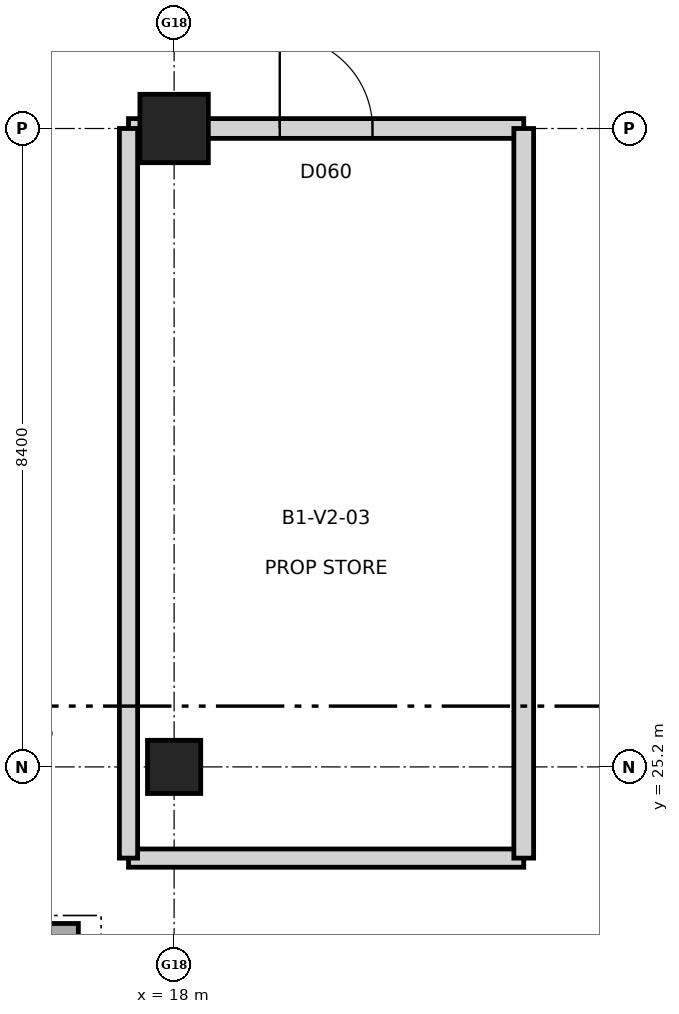
"""IFC4 building model, lengths in metres.
Left out: names, types, materials, properties, quantities, classifications, styles, units other than length and angle.
Written with IfcOpenShell. Run it as: python <this file> out.ifc"""

import sys

from ifc_helpers import new_model, si_unit, direction, frame, frame_2d, origin, origin_2d, place, context, subcontext, project, spatial, rectangle, extrude, element, fill, save


model = new_model("IFC4")
c1 = context("Model", 3, precision=1e-05, world=origin(), true_north=direction((0.0, 1.0)))
c2 = subcontext(c1, "Body", "Model", "MODEL_VIEW")
j1 = project(units=[si_unit("LENGTHUNIT", "METRE"), si_unit("PLANEANGLEUNIT", "RADIAN")], contexts=[c1])
p1 = place(None, origin())
s1 = spatial("IfcSite", under=j1, at=p1, CompositionType="ELEMENT")
p2 = place(p1, origin())
s2 = spatial("IfcBuilding", under=s1, at=p2, CompositionType="ELEMENT")
p3 = place(p2, frame((0.0, 0.0, -5.4)))
s3 = spatial("IfcBuildingStorey", under=s2, at=p3, CompositionType="ELEMENT", Elevation=-5.4)
p4 = place(p3, frame((18.0, 25.2, 0.0), z_axis=(0.0, 0.0, 1.0), x_axis=(1.0, 0.0, 0.0)))
e1 = element("IfcColumn", 1, at=p4, inside=s3, PredefinedType="COLUMN", context=c2, shape_type="SweptSolid", body=[
    extrude(rectangle(XDim=0.7, YDim=0.7, at=origin_2d()), origin(), (0.0, 0.0, 1.0), 5.4),
])
p5 = place(p3, frame((18.0, 33.6, 0.0), z_axis=(0.0, 0.0, 1.0), x_axis=(1.0, 0.0, 0.0)))
e2 = element("IfcColumn", 2, at=p5, inside=s3, PredefinedType="COLUMN", context=c2, shape_type="SweptSolid", body=[
    extrude(rectangle(XDim=0.9, YDim=0.9, at=origin_2d()), origin(), (0.0, 0.0, 1.0), 5.4),
])
p6 = place(p3, frame((13.26, 22.945, 0.0), z_axis=(0.0, 0.0, 1.0), x_axis=(1.0, 0.0, 0.0)))
e3 = element("IfcWall", 3, at=p6, inside=s3, PredefinedType="SHEAR", context=c2, shape_type="SweptSolid", body=[
    extrude(rectangle(XDim=3.48, YDim=0.39, at=frame_2d((1.74, 0.0))), origin(), (0.0, 0.0, 1.0), 5.4),
])
p7 = place(p6, frame((1.19, 0.0, 0.0)))
e4 = element("IfcOpeningElement", 4, at=p7, cuts=e3, PredefinedType="OPENING", context=c2, shape_type="SweptSolid", body=[
    extrude(rectangle(XDim=1.1, YDim=2.15, at=frame_2d((0.55, 1.075))), frame((0.0, 0.205, 0.0), z_axis=(0.0, -1.0, 0.0), x_axis=(1.0, 0.0, 0.0)), (0.0, 0.0, 1.0), 0.41),
])
p8 = place(p3, frame((17.4, 24.0, 0.0), z_axis=(0.0, 0.0, 1.0), x_axis=(1.0, 0.0, 0.0)))
e5 = element("IfcWall", 5, at=p8, inside=s3, PredefinedType="PARTITIONING", context=c2, shape_type="SweptSolid", body=[
    extrude(rectangle(XDim=5.2, YDim=0.24, at=frame_2d((2.6, 0.0))), origin(), (0.0, 0.0, 1.0), 5.02),
])
p9 = place(p3, frame((17.4, 33.6, 0.0), z_axis=(0.0, 0.0, 1.0), x_axis=(1.0, 0.0, 0.0)))
e6 = element("IfcWall", 6, at=p9, inside=s3, PredefinedType="PARTITIONING", context=c2, shape_type="SweptSolid", body=[
    extrude(rectangle(XDim=5.2, YDim=0.26, at=frame_2d((2.6, 0.0))), origin(), (0.0, 0.0, 1.0), 4.359),
])
p10 = place(p9, frame((1.99, 0.0, 0.0)))
e7 = element("IfcOpeningElement", 7, at=p10, cuts=e6, PredefinedType="OPENING", context=c2, shape_type="SweptSolid", body=[
    extrude(rectangle(XDim=1.22, YDim=2.3, at=frame_2d((0.61, 1.15))), frame((0.0, 0.14, 0.0), z_axis=(0.0, -1.0, 0.0), x_axis=(1.0, 0.0, 0.0)), (0.0, 0.0, 1.0), 0.28),
])
p11 = place(p3, frame((17.4, 24.0, 0.0), z_axis=(0.0, 0.0, 1.0), x_axis=(0.0, 1.0, 0.0)))
e8 = element("IfcWall", 8, at=p11, inside=s3, PredefinedType="PARTITIONING", context=c2, shape_type="SweptSolid", body=[
    extrude(rectangle(XDim=9.6, YDim=0.24, at=frame_2d((4.8, 0.0))), origin(), (0.0, 0.0, 1.0), 5.02),
])
p12 = place(p3, frame((22.6, 24.0, 0.0), z_axis=(0.0, 0.0, 1.0), x_axis=(0.0, 1.0, 0.0)))
e9 = element("IfcWall", 9, at=p12, inside=s3, PredefinedType="PARTITIONING", context=c2, shape_type="SweptSolid", body=[
    extrude(rectangle(XDim=9.6, YDim=0.26, at=frame_2d((4.8, 0.0))), origin(), (0.0, 0.0, 1.0), 5.02),
])
p13 = place(p10, origin())
e10 = element("IfcDoor", 10, at=p13, inside=s3, OperationType="SINGLE_SWING_LEFT", PredefinedType="DOOR", context=c2, shape_type="SweptSolid", body=[
    extrude(rectangle(XDim=1.22, YDim=2.3, at=frame_2d((0.61, 1.15))), frame((0.0, 0.025, 0.0), z_axis=(0.0, -1.0, 0.0), x_axis=(1.0, 0.0, 0.0)), (0.0, 0.0, 1.0), 0.05),
])
fill(e7, e10)
save(model, sys.argv[1])
